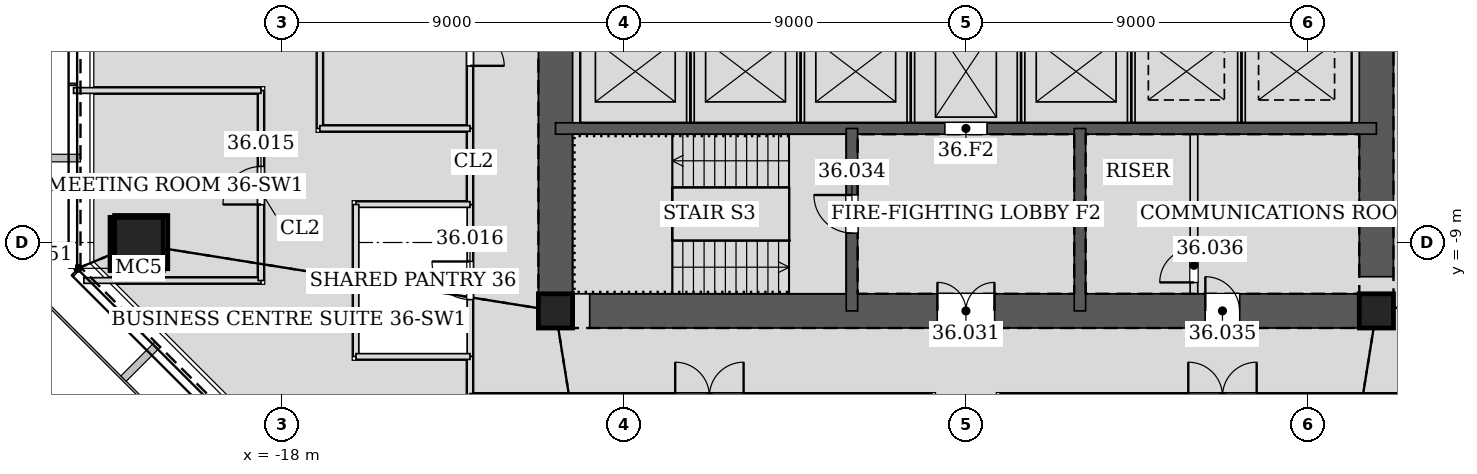
"""IFC4 building model, lengths in metres.
Left out: names, types, materials, properties, quantities, classifications, styles, units other than length and angle.
Written with IfcOpenShell. Run it as: python <this file> out.ifc"""

import sys

from ifc_helpers import new_model, si_unit, direction, frame, frame_2d, origin, origin_2d, place, context, subcontext, project, spatial, rectangle, hollow_rectangle, extrude, element, fill, save


model = new_model("IFC4")
c1 = context("Model", 3, precision=1e-05, world=origin(), true_north=direction((0.0, 1.0)))
c2 = subcontext(c1, "Body", "Model", "MODEL_VIEW")
j1 = project(units=[si_unit("LENGTHUNIT", "METRE"), si_unit("PLANEANGLEUNIT", "RADIAN")], contexts=[c1])
p1 = place(None, origin())
s1 = spatial("IfcSite", under=j1, at=p1, CompositionType="ELEMENT")
p2 = place(p1, origin())
s2 = spatial("IfcBuilding", under=s1, at=p2, CompositionType="ELEMENT")
p3 = place(p2, frame((0.0, 0.0, 159.6)))
s3 = spatial("IfcBuildingStorey", under=s2, at=p3, CompositionType="ELEMENT", Elevation=159.6)
p4 = place(p3, frame((-21.822, -9.039, 0.0), z_axis=(0.028237674468, 0.01173664659, 0.999532333078), x_axis=(-0.38380575713, 0.923413851312, 0.0)))
e1 = element("IfcColumn", 1, at=p4, inside=s3, PredefinedType="COLUMN", context=c2, shape_type="SweptSolid", body=[
    extrude(hollow_rectangle(XDim=1.4, YDim=1.4, WallThickness=0.065, at=origin_2d()), origin(), (0.0, 0.0, 1.0), 4.202),
])
for number, where, z_axis, x_axis in (
    (2, (-10.8, -10.8, 0.0), (0.0, 0.0, 1.0), (1.0, 0.0, 0.0)),
    (3, (10.8, -10.8, 0.0), (0.0, 0.0, 1.0), (1.0, 0.0, 0.0)),
):
    element("IfcColumn", number, at=place(p3, frame(where, z_axis=z_axis, x_axis=x_axis)), inside=s3, PredefinedType="COLUMN", context=c2, shape_type="SweptSolid", body=[
        extrude(hollow_rectangle(XDim=0.9, YDim=0.9, WallThickness=0.06, at=origin_2d()), origin(), (0.0, 0.0, 1.0), 4.2),
    ])
p5 = place(p3, frame((-10.8, -10.8, 0.0), z_axis=(0.0, 0.0, 1.0), x_axis=(1.0, 0.0, 0.0)))
e4 = element("IfcWall", 4, at=p5, inside=s3, PredefinedType="SOLIDWALL", context=c2, shape_type="SweptSolid", body=[
    extrude(rectangle(XDim=21.6, YDim=0.9, at=frame_2d((10.8, 0.0))), origin(), (0.0, 0.0, 1.0), 4.2),
])
p6 = place(p5, frame((10.05, 0.0, 0.0)))
e5 = element("IfcOpeningElement", 5, at=p6, cuts=e4, PredefinedType="OPENING", context=c2, shape_type="SweptSolid", body=[
    extrude(rectangle(XDim=1.5, YDim=2.1, at=frame_2d((0.75, 1.05))), frame((0.0, 0.46, 0.0), z_axis=(0.0, -1.0, 0.0), x_axis=(1.0, 0.0, 0.0)), (0.0, 0.0, 1.0), 0.92),
])
p7 = place(p5, frame((17.1, 0.0, 0.0)))
e6 = element("IfcOpeningElement", 6, at=p7, cuts=e4, PredefinedType="OPENING", context=c2, shape_type="SweptSolid", body=[
    extrude(rectangle(XDim=0.9, YDim=2.1, at=frame_2d((0.45, 1.05))), frame((0.0, 0.46, 0.0), z_axis=(0.0, -1.0, 0.0), x_axis=(1.0, 0.0, 0.0)), (0.0, 0.0, 1.0), 0.92),
])
p8 = place(p3, frame((10.8, -10.8, 0.0), z_axis=(0.0, 0.0, 1.0), x_axis=(0.0, 1.0, 0.0)))
e7 = element("IfcWall", 7, at=p8, inside=s3, PredefinedType="SOLIDWALL", context=c2, shape_type="SweptSolid", body=[
    extrude(rectangle(XDim=21.6, YDim=0.9, at=frame_2d((10.8, 0.0))), origin(), (0.0, 0.0, 1.0), 4.2),
])
p9 = place(p8, frame((11.7, 0.0, 0.0)))
e8 = element("IfcOpeningElement", 8, at=p9, cuts=e7, PredefinedType="OPENING", context=c2, shape_type="SweptSolid", body=[
    extrude(rectangle(XDim=1.2, YDim=2.1, at=frame_2d((0.6, 1.05))), frame((0.0, 0.46, 0.0), z_axis=(0.0, -1.0, 0.0), x_axis=(1.0, 0.0, 0.0)), (0.0, 0.0, 1.0), 0.92),
])
p10 = place(p8, frame((8.7, 0.0, 0.0)))
e9 = element("IfcOpeningElement", 9, at=p10, cuts=e7, PredefinedType="OPENING", context=c2, shape_type="SweptSolid", body=[
    extrude(rectangle(XDim=1.2, YDim=2.1, at=frame_2d((0.6, 1.05))), frame((0.0, 0.46, 0.0), z_axis=(0.0, -1.0, 0.0), x_axis=(1.0, 0.0, 0.0)), (0.0, 0.0, 1.0), 0.92),
])
p11 = place(p3, frame((-10.8, 10.8, 0.0), z_axis=(0.0, 0.0, 1.0), x_axis=(0.0, -1.0, 0.0)))
e10 = element("IfcWall", 10, at=p11, inside=s3, PredefinedType="SOLIDWALL", context=c2, shape_type="SweptSolid", body=[
    extrude(rectangle(XDim=21.6, YDim=0.9, at=frame_2d((10.8, 0.0))), origin(), (0.0, 0.0, 1.0), 4.2),
])
p12 = place(p11, frame((8.7, 0.0, 0.0)))
e11 = element("IfcOpeningElement", 11, at=p12, cuts=e10, PredefinedType="OPENING", context=c2, shape_type="SweptSolid", body=[
    extrude(rectangle(XDim=1.2, YDim=2.1, at=frame_2d((0.6, 1.05))), frame((0.0, 0.46, 0.0), z_axis=(0.0, -1.0, 0.0), x_axis=(1.0, 0.0, 0.0)), (0.0, 0.0, 1.0), 0.92),
])
p13 = place(p11, frame((11.7, 0.0, 0.0)))
e12 = element("IfcOpeningElement", 12, at=p13, cuts=e10, PredefinedType="OPENING", context=c2, shape_type="SweptSolid", body=[
    extrude(rectangle(XDim=1.2, YDim=2.1, at=frame_2d((0.6, 1.05))), frame((0.0, 0.46, 0.0), z_axis=(0.0, -1.0, 0.0), x_axis=(1.0, 0.0, 0.0)), (0.0, 0.0, 1.0), 0.92),
])
p14 = place(p3, frame((-10.8, -6.0, 0.0), z_axis=(0.0, 0.0, 1.0), x_axis=(1.0, 0.0, 0.0)))
e13 = element("IfcWall", 13, at=p14, inside=s3, PredefinedType="SOLIDWALL", context=c2, shape_type="SweptSolid", body=[
    extrude(rectangle(XDim=21.6, YDim=0.3, at=frame_2d((10.8, 0.0))), origin(), (0.0, 0.0, 1.0), 4.2),
])
p15 = place(p14, frame((10.25, 0.0, 0.0)))
e14 = element("IfcOpeningElement", 14, at=p15, cuts=e13, PredefinedType="OPENING", context=c2, shape_type="SweptSolid", body=[
    extrude(rectangle(XDim=1.1, YDim=2.1, at=frame_2d((0.55, 1.05))), frame((0.0, 0.16, 0.0), z_axis=(0.0, -1.0, 0.0), x_axis=(1.0, 0.0, 0.0)), (0.0, 0.0, 1.0), 0.32),
])
p16 = place(p3, frame((-3.0, -6.0, 0.0), z_axis=(0.0, 0.0, 1.0), x_axis=(0.0, -1.0, 0.0)))
e15 = element("IfcWall", 15, at=p16, inside=s3, PredefinedType="SOLIDWALL", context=c2, shape_type="SweptSolid", body=[
    extrude(rectangle(XDim=4.8, YDim=0.3, at=frame_2d((2.4, 0.0))), origin(), (0.0, 0.0, 1.0), 4.2),
])
p17 = place(p16, frame((1.75, 0.0, 0.0)))
e16 = element("IfcOpeningElement", 16, at=p17, cuts=e15, PredefinedType="OPENING", context=c2, shape_type="SweptSolid", body=[
    extrude(rectangle(XDim=1.0, YDim=2.1, at=frame_2d((0.5, 1.05))), frame((0.0, 0.16, 0.0), z_axis=(0.0, -1.0, 0.0), x_axis=(1.0, 0.0, 0.0)), (0.0, 0.0, 1.0), 0.32),
])
p18 = place(p3, frame((3.0, -6.0, 0.0), z_axis=(0.0, 0.0, 1.0), x_axis=(0.0, -1.0, 0.0)))
e17 = element("IfcWall", 17, at=p18, inside=s3, PredefinedType="SOLIDWALL", context=c2, shape_type="SweptSolid", body=[
    extrude(rectangle(XDim=4.8, YDim=0.3, at=frame_2d((2.4, 0.0))), origin(), (0.0, 0.0, 1.0), 4.2),
])
p19 = place(p3, frame((-13.05, -7.999, 0.0), z_axis=(0.0, 0.0, 1.0), x_axis=(0.0, -1.0, 0.0)))
e18 = element("IfcWall", 18, at=p19, inside=s3, PredefinedType="PARTITIONING", context=c2, shape_type="SweptSolid", body=[
    extrude(rectangle(XDim=4.002, YDim=0.15, at=frame_2d((2.001, 0.0))), origin(), (0.0, 0.0, 1.0), 3.098),
])
p20 = place(p19, frame((1.501, 0.0, 0.0)))
e19 = element("IfcOpeningElement", 19, at=p20, cuts=e18, PredefinedType="OPENING", context=c2, shape_type="SweptSolid", body=[
    extrude(rectangle(XDim=1.0, YDim=2.1, at=frame_2d((0.5, 1.05))), frame((0.0, 0.085, 0.0), z_axis=(0.0, -1.0, 0.0), x_axis=(1.0, 0.0, 0.0)), (0.0, 0.0, 1.0), 0.17),
])
p21 = place(p3, frame((-13.05, -0.9, 0.0), z_axis=(0.0, 0.0, 1.0), x_axis=(0.0, -1.0, 0.0)))
e20 = element("IfcWall", 20, at=p21, inside=s3, PredefinedType="PARTITIONING", context=c2, shape_type="SweptSolid", body=[
    extrude(rectangle(XDim=5.101, YDim=0.15, at=frame_2d((2.551, 0.0))), origin(), (0.0, 0.0, 1.0), 4.035),
])
p22 = place(p21, frame((1.65, 0.0, 0.0)))
e21 = element("IfcOpeningElement", 21, at=p22, cuts=e20, PredefinedType="OPENING", context=c2, shape_type="SweptSolid", body=[
    extrude(rectangle(XDim=1.8, YDim=2.4, at=frame_2d((0.9, 1.2))), frame((0.0, 0.085, 0.0), z_axis=(0.0, -1.0, 0.0), x_axis=(1.0, 0.0, 0.0)), (0.0, 0.0, 1.0), 0.17),
])
p23 = place(p3, frame((-13.05, -11.999, 0.0), z_axis=(0.0, 0.0, 1.0), x_axis=(0.0, -1.0, 0.0)))
e22 = element("IfcWall", 22, at=p23, inside=s3, PredefinedType="PARTITIONING", context=c2, shape_type="SweptSolid", body=[
    extrude(rectangle(XDim=1.051, YDim=0.15, at=frame_2d((0.525, 0.0))), origin(), (0.0, 0.0, 1.0), 3.332),
])
p24 = place(p3, frame((-13.05, -13.05, 0.0), z_axis=(0.0, 0.0, 1.0), x_axis=(1.0, 0.0, 0.0)))
e23 = element("IfcWall", 23, at=p24, inside=s3, PredefinedType="PARTITIONING", context=c2, shape_type="SweptSolid", body=[
    extrude(rectangle(XDim=0.451, YDim=0.15, at=frame_2d((0.226, 0.0))), origin(), (0.0, 0.0, 1.0), 3.332),
])
p25 = place(p3, frame((-13.05, -5.999, 0.0), z_axis=(0.0, 0.0, 1.0), x_axis=(0.0, -1.0, 0.0)))
e24 = element("IfcWall", 24, at=p25, inside=s3, PredefinedType="PARTITIONING", context=c2, shape_type="SweptSolid", body=[
    extrude(rectangle(XDim=2.002, YDim=0.15, at=frame_2d((1.001, 0.0))), origin(), (0.0, 0.0, 1.0), 4.035),
])
p26 = place(p3, frame((-12.601, -13.05, 0.0), z_axis=(0.0, 0.0, 1.0), x_axis=(1.0, 0.0, 0.0)))
e25 = element("IfcWall", 25, at=p26, inside=s3, PredefinedType="PARTITIONING", context=c2, shape_type="SweptSolid", body=[
    extrude(rectangle(XDim=11.701, YDim=0.15, at=frame_2d((5.851, 0.0))), origin(), (0.0, 0.0, 1.0), 3.098),
])
p27 = place(p26, frame((4.95, 0.0, 0.0)))
e26 = element("IfcOpeningElement", 26, at=p27, cuts=e25, PredefinedType="OPENING", context=c2, shape_type="SweptSolid", body=[
    extrude(rectangle(XDim=1.8, YDim=2.4, at=frame_2d((0.9, 1.2))), frame((0.0, 0.085, 0.0), z_axis=(0.0, -1.0, 0.0), x_axis=(1.0, 0.0, 0.0)), (0.0, 0.0, 1.0), 0.17),
])
p28 = place(p3, frame((0.9, -13.05, 0.0), z_axis=(0.0, 0.0, 1.0), x_axis=(1.0, 0.0, 0.0)))
e27 = element("IfcWall", 27, at=p28, inside=s3, PredefinedType="PARTITIONING", context=c2, shape_type="SweptSolid", body=[
    extrude(rectangle(XDim=11.701, YDim=0.15, at=frame_2d((5.851, 0.0))), origin(), (0.0, 0.0, 1.0), 3.098),
])
p29 = place(p28, frame((4.95, 0.0, 0.0)))
e28 = element("IfcOpeningElement", 28, at=p29, cuts=e27, PredefinedType="OPENING", context=c2, shape_type="SweptSolid", body=[
    extrude(rectangle(XDim=1.8, YDim=2.4, at=frame_2d((0.9, 1.2))), frame((0.0, 0.085, 0.0), z_axis=(0.0, -1.0, 0.0), x_axis=(1.0, 0.0, 0.0)), (0.0, 0.0, 1.0), 0.17),
])
p30 = place(p3, frame((-23.21, -10.0, 0.0), z_axis=(0.0, 0.0, 1.0), x_axis=(1.0, 0.0, 0.0)))
e29 = element("IfcWall", 29, at=p30, inside=s3, PredefinedType="PARTITIONING", context=c2, shape_type="SweptSolid", body=[
    extrude(rectangle(XDim=4.66, YDim=0.15, at=frame_2d((2.33, 0.0))), origin(), (0.0, 0.0, 1.0), 3.499),
])
p31 = place(p3, frame((-18.55, -10.0, 0.0), z_axis=(0.0, 0.0, 1.0), x_axis=(0.0, 1.0, 0.0)))
e30 = element("IfcWall", 30, at=p31, inside=s3, PredefinedType="PARTITIONING", context=c2, shape_type="SweptSolid", body=[
    extrude(rectangle(XDim=5.0, YDim=0.15, at=frame_2d((2.5, 0.0))), origin(), (0.0, 0.0, 1.0), 3.098),
])
p32 = place(p31, frame((2.0, 0.0, 0.0)))
e31 = element("IfcOpeningElement", 31, at=p32, cuts=e30, PredefinedType="OPENING", context=c2, shape_type="SweptSolid", body=[
    extrude(rectangle(XDim=1.0, YDim=2.1, at=frame_2d((0.5, 1.05))), frame((0.0, 0.085, 0.0), z_axis=(0.0, -1.0, 0.0), x_axis=(1.0, 0.0, 0.0)), (0.0, 0.0, 1.0), 0.17),
])
p33 = place(p3, frame((-18.55, -5.0, 0.0), z_axis=(0.0, 0.0, 1.0), x_axis=(-1.0, 0.0, 0.0)))
e32 = element("IfcWall", 32, at=p33, inside=s3, PredefinedType="PARTITIONING", context=c2, shape_type="SweptSolid", body=[
    extrude(rectangle(XDim=4.932, YDim=0.15, at=frame_2d((2.466, 0.0))), origin(), (0.0, 0.0, 1.0), 3.423),
])
p34 = place(p3, frame((-13.05, -8.0, 0.0), z_axis=(0.0, 0.0, 1.0), x_axis=(-1.0, 0.0, 0.0)))
e33 = element("IfcWall", 33, at=p34, inside=s3, PredefinedType="PARTITIONING", context=c2, shape_type="SweptSolid", body=[
    extrude(rectangle(XDim=3.0, YDim=0.15, at=frame_2d((1.5, 0.0))), origin(), (0.0, 0.0, 1.0), 3.491),
])
p35 = place(p3, frame((-16.05, -8.0, 0.0), z_axis=(0.0, 0.0, 1.0), x_axis=(0.0, -1.0, 0.0)))
e34 = element("IfcWall", 34, at=p35, inside=s3, PredefinedType="PARTITIONING", context=c2, shape_type="SweptSolid", body=[
    extrude(rectangle(XDim=4.0, YDim=0.15, at=frame_2d((2.0, 0.0))), origin(), (0.0, 0.0, 1.0), 3.098),
])
p36 = place(p3, frame((-16.05, -12.0, 0.0), z_axis=(0.0, 0.0, 1.0), x_axis=(1.0, 0.0, 0.0)))
e35 = element("IfcWall", 35, at=p36, inside=s3, PredefinedType="PARTITIONING", context=c2, shape_type="SweptSolid", body=[
    extrude(rectangle(XDim=3.0, YDim=0.15, at=frame_2d((1.5, 0.0))), origin(), (0.0, 0.0, 1.0), 3.715),
])
p37 = place(p3, frame((-17.0, -0.9, 0.0), z_axis=(0.0, 0.0, 1.0), x_axis=(0.0, -1.0, 0.0)))
e36 = element("IfcWall", 36, at=p37, inside=s3, PredefinedType="PARTITIONING", context=c2, shape_type="SweptSolid", body=[
    extrude(rectangle(XDim=5.1, YDim=0.15, at=frame_2d((2.55, 0.0))), origin(), (0.0, 0.0, 1.0), 4.035),
])
p38 = place(p3, frame((-17.0, -6.0, 0.0), z_axis=(0.0, 0.0, 1.0), x_axis=(1.0, 0.0, 0.0)))
e37 = element("IfcWall", 37, at=p38, inside=s3, PredefinedType="PARTITIONING", context=c2, shape_type="SweptSolid", body=[
    extrude(rectangle(XDim=3.95, YDim=0.15, at=frame_2d((1.975, 0.0))), origin(), (0.0, 0.0, 1.0), 3.491),
])
for number, where, z_axis, x_axis in (
    (38, (-7.25, -5.85, 0.0), (0.0, 0.0, 1.0), (0.0, 1.0, 0.0)),
    (39, (-4.35, -5.85, 0.0), (0.0, 0.0, 1.0), (0.0, 1.0, 0.0)),
    (40, (-1.45, -5.85, 0.0), (0.0, 0.0, 1.0), (0.0, 1.0, 0.0)),
    (41, (1.45, -5.85, 0.0), (0.0, 0.0, 1.0), (0.0, 1.0, 0.0)),
    (42, (4.35, -5.85, 0.0), (0.0, 0.0, 1.0), (0.0, 1.0, 0.0)),
    (43, (7.25, -5.85, 0.0), (0.0, 0.0, 1.0), (0.0, 1.0, 0.0)),
):
    element("IfcWall", number, at=place(p3, frame(where, z_axis=z_axis, x_axis=x_axis)), inside=s3, PredefinedType="PARTITIONING", context=c2, shape_type="SweptSolid", body=[
        extrude(rectangle(XDim=2.7, YDim=0.2, at=frame_2d((1.35, 0.0))), origin(), (0.0, 0.0, 1.0), 4.2),
    ])
p39 = place(p3, frame((6.0, -10.35, 0.0), z_axis=(0.0, 0.0, 1.0), x_axis=(0.0, 1.0, 0.0)))
e44 = element("IfcWall", 44, at=p39, inside=s3, PredefinedType="PARTITIONING", context=c2, shape_type="SweptSolid", body=[
    extrude(rectangle(XDim=4.2, YDim=0.2, at=frame_2d((2.1, 0.0))), origin(), (0.0, 0.0, 1.0), 4.035),
])
p40 = place(p39, frame((0.3, 0.0, 0.0)))
e45 = element("IfcOpeningElement", 45, at=p40, cuts=e44, PredefinedType="OPENING", context=c2, shape_type="SweptSolid", body=[
    extrude(rectangle(XDim=0.9, YDim=2.1, at=frame_2d((0.45, 1.05))), frame((0.0, 0.11, 0.0), z_axis=(0.0, -1.0, 0.0), x_axis=(1.0, 0.0, 0.0)), (0.0, 0.0, 1.0), 0.22),
])
p41 = place(p32, origin())
e46 = element("IfcDoor", 46, at=p41, inside=s3, OperationType="SINGLE_SWING_LEFT", PredefinedType="DOOR", context=c2, shape_type="SweptSolid", body=[
    extrude(rectangle(XDim=1.0, YDim=2.1, at=frame_2d((0.5, 1.05))), frame((0.0, 0.025, 0.0), z_axis=(0.0, -1.0, 0.0), x_axis=(1.0, 0.0, 0.0)), (0.0, 0.0, 1.0), 0.05),
])
fill(e31, e46)
p42 = place(p20, frame((1.0, 0.0, 0.0), z_axis=(0.0, 0.0, 1.0), x_axis=(-1.0, 0.0, 0.0)))
e47 = element("IfcDoor", 47, at=p42, inside=s3, OperationType="SINGLE_SWING_RIGHT", PredefinedType="DOOR", context=c2, shape_type="SweptSolid", body=[
    extrude(rectangle(XDim=1.0, YDim=2.1, at=frame_2d((0.5, 1.05))), frame((0.0, 0.025, 0.0), z_axis=(0.0, -1.0, 0.0), x_axis=(1.0, 0.0, 0.0)), (0.0, 0.0, 1.0), 0.05),
])
fill(e19, e47)
p43 = place(p22, origin())
e48 = element("IfcDoor", 48, at=p43, inside=s3, OperationType="DOUBLE_DOOR_SINGLE_SWING", PredefinedType="DOOR", context=c2, shape_type="SweptSolid", body=[
    extrude(rectangle(XDim=1.8, YDim=2.4, at=frame_2d((0.9, 1.2))), frame((0.0, 0.025, 0.0), z_axis=(0.0, -1.0, 0.0), x_axis=(1.0, 0.0, 0.0)), (0.0, 0.0, 1.0), 0.05),
])
fill(e21, e48)
p44 = place(p6, origin())
e49 = element("IfcDoor", 49, at=p44, inside=s3, OperationType="DOUBLE_DOOR_SINGLE_SWING", PredefinedType="DOOR", context=c2, shape_type="SweptSolid", body=[
    extrude(rectangle(XDim=1.5, YDim=2.1, at=frame_2d((0.75, 1.05))), frame((0.0, 0.025, 0.0), z_axis=(0.0, -1.0, 0.0), x_axis=(1.0, 0.0, 0.0)), (0.0, 0.0, 1.0), 0.05),
])
fill(e5, e49)
p45 = place(p17, frame((1.0, 0.0, 0.0), z_axis=(0.0, 0.0, 1.0), x_axis=(-1.0, 0.0, 0.0)))
e50 = element("IfcDoor", 50, at=p45, inside=s3, OperationType="SINGLE_SWING_RIGHT", PredefinedType="DOOR", context=c2, shape_type="SweptSolid", body=[
    extrude(rectangle(XDim=1.0, YDim=2.1, at=frame_2d((0.5, 1.05))), frame((0.0, 0.025, 0.0), z_axis=(0.0, -1.0, 0.0), x_axis=(1.0, 0.0, 0.0)), (0.0, 0.0, 1.0), 0.05),
])
fill(e16, e50)
p46 = place(p7, origin())
e51 = element("IfcDoor", 51, at=p46, inside=s3, OperationType="SINGLE_SWING_LEFT", PredefinedType="DOOR", context=c2, shape_type="SweptSolid", body=[
    extrude(rectangle(XDim=0.9, YDim=2.1, at=frame_2d((0.45, 1.05))), frame((0.0, 0.025, 0.0), z_axis=(0.0, -1.0, 0.0), x_axis=(1.0, 0.0, 0.0)), (0.0, 0.0, 1.0), 0.05),
])
fill(e6, e51)
p47 = place(p40, origin())
e52 = element("IfcDoor", 52, at=p47, inside=s3, OperationType="SINGLE_SWING_LEFT", PredefinedType="DOOR", context=c2, shape_type="SweptSolid", body=[
    extrude(rectangle(XDim=0.9, YDim=2.1, at=frame_2d((0.45, 1.05))), frame((0.0, 0.025, 0.0), z_axis=(0.0, -1.0, 0.0), x_axis=(1.0, 0.0, 0.0)), (0.0, 0.0, 1.0), 0.05),
])
fill(e45, e52)
p48 = place(p15, origin())
e53 = element("IfcDoor", 53, at=p48, inside=s3, OperationType="DOUBLE_DOOR_SLIDING", PredefinedType="DOOR", context=c2, shape_type="SweptSolid", body=[
    extrude(rectangle(XDim=1.1, YDim=2.1, at=frame_2d((0.55, 1.05))), frame((0.0, 0.025, 0.0), z_axis=(0.0, -1.0, 0.0), x_axis=(1.0, 0.0, 0.0)), (0.0, 0.0, 1.0), 0.05),
])
fill(e14, e53)
save(model, sys.argv[1])
